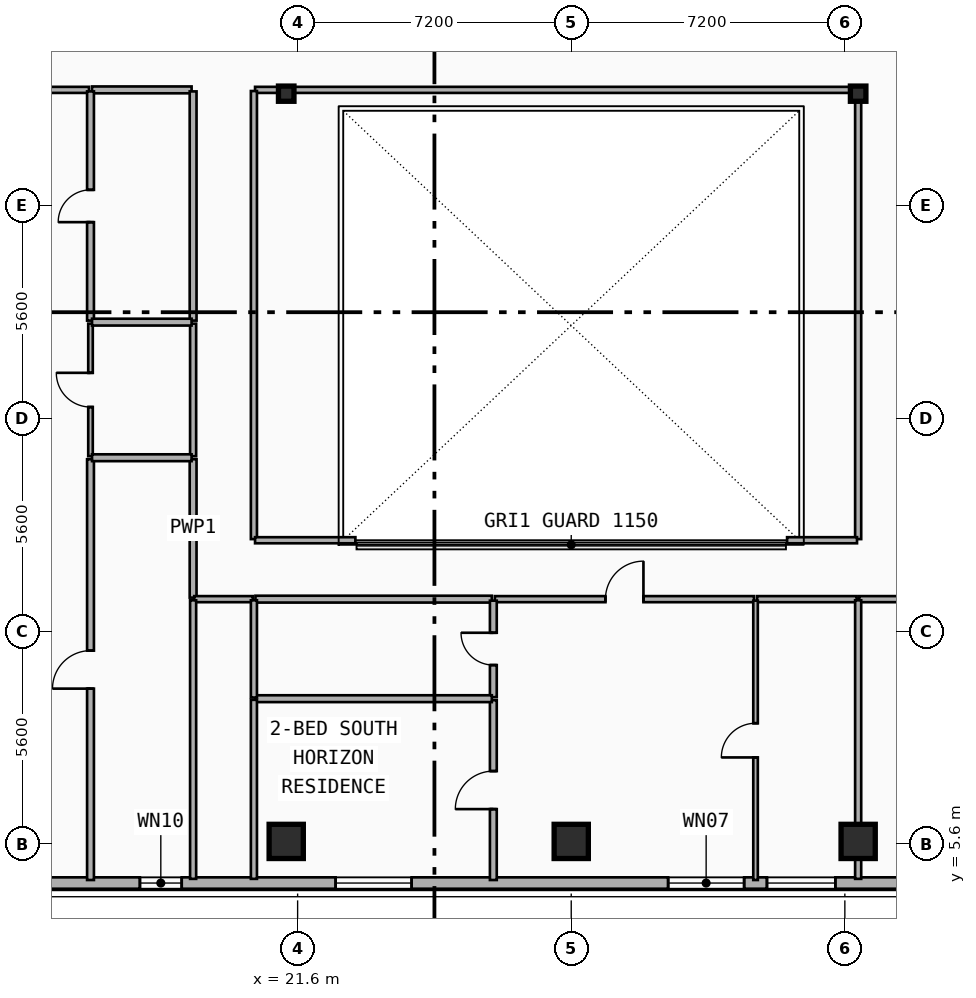
"""IFC4 building model, lengths in metres.
Left out: names, types, materials, properties, quantities, classifications, styles, units other than length and angle.
Written with IfcOpenShell. Run it as: python <this file> out.ifc"""

import sys

from ifc_helpers import new_model, si_unit, direction, frame, frame_2d, origin, origin_2d, place, context, subcontext, project, spatial, rectangle, i_section, extrude, element, fill, save


model = new_model("IFC4")
c1 = context("Model", 3, precision=1e-05, world=origin(), true_north=direction((0.0, 1.0)))
c2 = subcontext(c1, "Body", "Model", "MODEL_VIEW")
j1 = project(units=[si_unit("LENGTHUNIT", "METRE"), si_unit("PLANEANGLEUNIT", "RADIAN")], contexts=[c1])
p1 = place(None, origin())
s1 = spatial("IfcSite", under=j1, at=p1, CompositionType="ELEMENT")
p2 = place(p1, origin())
s2 = spatial("IfcBuilding", under=s1, at=p2, CompositionType="ELEMENT")
p3 = place(p2, frame((0.0, 0.0, 225.6)))
s3 = spatial("IfcBuildingStorey", under=s2, at=p3, CompositionType="ELEMENT", Elevation=225.6)
for number, where, z_axis, x_axis in (
    (1, (21.3, 25.35, 0.0), (0.0, 0.0, 1.0), (1.0, 0.0, 0.0)),
    (2, (36.35, 25.35, 0.0), (0.0, 0.0, 1.0), (1.0, 0.0, 0.0)),
):
    element("IfcColumn", number, at=place(p3, frame(where, z_axis=z_axis, x_axis=x_axis)), inside=s3, PredefinedType="COLUMN", context=c2, shape_type="SweptSolid", body=[
        extrude(i_section(OverallWidth=0.408, OverallDepth=0.4, WebThickness=0.025, FlangeThickness=0.039, FilletRadius=0.015, at=origin_2d()), origin(), (0.0, 0.0, 1.0), 3.6),
    ])
for number, where, z_axis, x_axis in (
    (3, (21.3, 5.784, 0.0), (0.0, -0.09, 0.996), (1.0, 0.0, 0.0)),
    (4, (28.8, 5.784, 0.0), (0.0, -0.09, 0.996), (1.0, 0.0, 0.0)),
    (5, (36.35, 5.784, 0.0), (0.0, -0.09, 0.996), (1.0, 0.0, 0.0)),
):
    element("IfcColumn", number, at=place(p3, frame(where, z_axis=z_axis, x_axis=x_axis)), inside=s3, PredefinedType="COLUMN", context=c2, shape_type="SweptSolid", body=[
        extrude(rectangle(XDim=0.9, YDim=0.9, at=origin_2d()), origin(), (0.0, 0.0, 1.0), 3.615),
    ])
p4 = place(p3, frame((48.0, 4.58, 0.0), z_axis=(0.0, 0.0, 1.0), x_axis=(-1.0, 0.0, 0.0)))
e6 = element("IfcWall", 6, at=p4, inside=s3, PredefinedType="SOLIDWALL", context=c2, shape_type="SweptSolid", body=[
    extrude(rectangle(XDim=38.4, YDim=0.3, at=frame_2d((19.2, 0.0))), origin(), (0.0, 0.0, 1.0), 3.34),
])
p5 = place(p4, frame((33.709, 0.0, 0.34)))
e7 = element("IfcOpeningElement", 7, at=p5, cuts=e6, PredefinedType="OPENING", context=c2, shape_type="SweptSolid", body=[
    extrude(rectangle(XDim=1.4, YDim=1.8, at=frame_2d((0.7, 0.9))), frame((0.0, 0.16, 0.0), z_axis=(0.0, -1.0, 0.0), x_axis=(1.0, 0.0, 0.0)), (0.0, 0.0, 1.0), 0.32),
])
p6 = place(p4, frame((29.45, 0.0, 1.85)))
e8 = element("IfcOpeningElement", 8, at=p6, cuts=e6, PredefinedType="OPENING", context=c2, shape_type="SweptSolid", body=[
    extrude(rectangle(XDim=1.1, YDim=0.9, at=frame_2d((0.55, 0.45))), frame((0.0, 0.16, 0.0), z_axis=(0.0, -1.0, 0.0), x_axis=(1.0, 0.0, 0.0)), (0.0, 0.0, 1.0), 0.32),
])
p7 = place(p4, frame((35.994, 0.0, 0.48)))
e9 = element("IfcOpeningElement", 9, at=p7, cuts=e6, PredefinedType="OPENING", context=c2, shape_type="SweptSolid", body=[
    extrude(rectangle(XDim=1.8, YDim=1.8, at=frame_2d((0.9, 0.9))), frame((0.0, 0.16, 0.0), z_axis=(0.0, -1.0, 0.0), x_axis=(1.0, 0.0, 0.0)), (0.0, 0.0, 1.0), 0.32),
])
p8 = place(p4, frame((14.65, 0.0, 0.65)))
e10 = element("IfcOpeningElement", 10, at=p8, cuts=e6, PredefinedType="OPENING", context=c2, shape_type="SweptSolid", body=[
    extrude(rectangle(XDim=2.0, YDim=2.2, at=frame_2d((1.0, 1.1))), frame((0.0, 0.16, 0.0), z_axis=(0.0, -1.0, 0.0), x_axis=(1.0, 0.0, 0.0)), (0.0, 0.0, 1.0), 0.32),
])
p9 = place(p4, frame((23.4, 0.0, 0.65)))
e11 = element("IfcOpeningElement", 11, at=p9, cuts=e6, PredefinedType="OPENING", context=c2, shape_type="SweptSolid", body=[
    extrude(rectangle(XDim=2.0, YDim=2.2, at=frame_2d((1.0, 1.1))), frame((0.0, 0.16, 0.0), z_axis=(0.0, -1.0, 0.0), x_axis=(1.0, 0.0, 0.0)), (0.0, 0.0, 1.0), 0.32),
])
p10 = place(p4, frame((12.25, 0.0, 0.8)))
e12 = element("IfcOpeningElement", 12, at=p10, cuts=e6, PredefinedType="OPENING", context=c2, shape_type="SweptSolid", body=[
    extrude(rectangle(XDim=1.8, YDim=1.8, at=frame_2d((0.9, 0.9))), frame((0.0, 0.16, 0.0), z_axis=(0.0, -1.0, 0.0), x_axis=(1.0, 0.0, 0.0)), (0.0, 0.0, 1.0), 0.32),
])
p11 = place(p4, frame((3.691, 0.0, 1.22)))
e13 = element("IfcOpeningElement", 13, at=p11, cuts=e6, PredefinedType="OPENING", context=c2, shape_type="SweptSolid", body=[
    extrude(rectangle(XDim=1.2, YDim=1.5, at=frame_2d((0.6, 0.75))), frame((0.0, 0.16, 0.0), z_axis=(0.0, -1.0, 0.0), x_axis=(1.0, 0.0, 0.0)), (0.0, 0.0, 1.0), 0.32),
])
p12 = place(p4, frame((8.25, 0.0, 0.52)))
e14 = element("IfcOpeningElement", 14, at=p12, cuts=e6, PredefinedType="OPENING", context=c2, shape_type="SweptSolid", body=[
    extrude(rectangle(XDim=1.1, YDim=1.05, at=frame_2d((0.55, 0.525))), frame((0.0, 0.16, 0.0), z_axis=(0.0, -1.0, 0.0), x_axis=(1.0, 0.0, 0.0)), (0.0, 0.0, 1.0), 0.32),
])
p13 = place(p4, frame((0.805, 0.0, 0.48)))
e15 = element("IfcOpeningElement", 15, at=p13, cuts=e6, PredefinedType="OPENING", context=c2, shape_type="SweptSolid", body=[
    extrude(rectangle(XDim=1.8, YDim=1.8, at=frame_2d((0.9, 0.9))), frame((0.0, 0.16, 0.0), z_axis=(0.0, -1.0, 0.0), x_axis=(1.0, 0.0, 0.0)), (0.0, 0.0, 1.0), 0.32),
])
p14 = place(p3, frame((12.631, 25.45, 0.0), z_axis=(0.0, 0.0, 1.0), x_axis=(1.0, 0.0, 0.0)))
e16 = element("IfcWall", 16, at=p14, inside=s3, PredefinedType="PARTITIONING", context=c2, shape_type="SweptSolid", body=[
    extrude(rectangle(XDim=3.479, YDim=0.16, at=frame_2d((1.74, 0.0))), origin(), (0.0, 0.0, 1.0), 2.52),
])
p15 = place(p14, frame((1.24, 0.0, 0.0)))
e17 = element("IfcOpeningElement", 17, at=p15, cuts=e16, PredefinedType="OPENING", context=c2, shape_type="SweptSolid", body=[
    extrude(rectangle(XDim=1.0, YDim=2.15, at=frame_2d((0.5, 1.075))), frame((0.0, 0.09, 0.0), z_axis=(0.0, -1.0, 0.0), x_axis=(1.0, 0.0, 0.0)), (0.0, 0.0, 1.0), 0.18),
])
p16 = place(p3, frame((16.19, 25.45, 0.0), z_axis=(0.0, 0.0, 1.0), x_axis=(1.0, 0.0, 0.0)))
e18 = element("IfcWall", 18, at=p16, inside=s3, PredefinedType="PLUMBINGWALL", context=c2, shape_type="SweptSolid", body=[
    extrude(rectangle(XDim=2.62, YDim=0.18, at=frame_2d((1.31, 0.0))), origin(), (0.0, 0.0, 1.0), 3.34),
])
p17 = place(p3, frame((18.85, 12.09, 0.0), z_axis=(0.0, 0.0, 1.0), x_axis=(0.0, 1.0, 0.0)))
e19 = element("IfcWall", 19, at=p17, inside=s3, PredefinedType="PLUMBINGWALL", context=c2, shape_type="SweptSolid", body=[
    extrude(rectangle(XDim=3.641, YDim=0.18, at=frame_2d((1.82, 0.0))), origin(), (0.0, 0.0, 1.0), 2.88),
])
p18 = place(p3, frame((18.85, 15.811, 0.0), z_axis=(0.0, 0.0, 1.0), x_axis=(0.0, 1.0, 0.0)))
e20 = element("IfcWall", 20, at=p18, inside=s3, PredefinedType="PARTITIONING", context=c2, shape_type="SweptSolid", body=[
    extrude(rectangle(XDim=3.488, YDim=0.16, at=frame_2d((1.744, 0.0))), origin(), (0.0, 0.0, 1.0), 2.87),
])
p19 = place(p3, frame((18.85, 19.379, 0.0), z_axis=(0.0, 0.0, 1.0), x_axis=(0.0, 1.0, 0.0)))
e21 = element("IfcWall", 21, at=p19, inside=s3, PredefinedType="PLUMBINGWALL", context=c2, shape_type="SweptSolid", body=[
    extrude(rectangle(XDim=6.031, YDim=0.18, at=frame_2d((3.016, 0.0))), origin(), (0.0, 0.0, 1.0), 2.87),
])
p20 = place(p3, frame((26.79, 12.05, 0.0), z_axis=(0.0, 0.0, 1.0), x_axis=(1.0, 0.0, 0.0)))
e22 = element("IfcWall", 22, at=p20, inside=s3, PredefinedType="PARTITIONING", context=c2, shape_type="SweptSolid", body=[
    extrude(rectangle(XDim=6.82, YDim=0.16, at=frame_2d((3.41, 0.0))), origin(), (0.0, 0.0, 1.0), 2.52),
])
p21 = place(p20, frame((2.91, 0.0, 0.0)))
e23 = element("IfcOpeningElement", 23, at=p21, cuts=e22, PredefinedType="OPENING", context=c2, shape_type="SweptSolid", body=[
    extrude(rectangle(XDim=1.0, YDim=2.15, at=frame_2d((0.5, 1.075))), frame((0.0, 0.09, 0.0), z_axis=(0.0, -1.0, 0.0), x_axis=(1.0, 0.0, 0.0)), (0.0, 0.0, 1.0), 0.18),
])
p22 = place(p3, frame((20.49, 12.05, 0.0), z_axis=(0.0, 0.0, 1.0), x_axis=(1.0, 0.0, 0.0)))
e24 = element("IfcWall", 24, at=p22, inside=s3, PredefinedType="PLUMBINGWALL", context=c2, shape_type="SweptSolid", body=[
    extrude(rectangle(XDim=6.22, YDim=0.18, at=frame_2d((3.11, 0.0))), origin(), (0.0, 0.0, 1.0), 2.52),
])
p23 = place(p3, frame((33.69, 12.05, 0.0), z_axis=(0.0, 0.0, 1.0), x_axis=(1.0, 0.0, 0.0)))
e25 = element("IfcWall", 25, at=p23, inside=s3, PredefinedType="PARTITIONING", context=c2, shape_type="SweptSolid", body=[
    extrude(rectangle(XDim=2.62, YDim=0.16, at=frame_2d((1.31, 0.0))), origin(), (0.0, 0.0, 1.0), 2.52),
])
p24 = place(p3, frame((16.15, 4.66, 0.0), z_axis=(0.0, 0.0, 1.0), x_axis=(0.0, 1.0, 0.0)))
e26 = element("IfcWall", 26, at=p24, inside=s3, PredefinedType="PLUMBINGWALL", context=c2, shape_type="SweptSolid", body=[
    extrude(rectangle(XDim=11.071, YDim=0.18, at=frame_2d((5.536, 0.0))), origin(), (0.0, 0.0, 1.0), 2.87),
])
p25 = place(p24, frame((5.035, 0.0, 0.0)))
e27 = element("IfcOpeningElement", 27, at=p25, cuts=e26, PredefinedType="OPENING", context=c2, shape_type="SweptSolid", body=[
    extrude(rectangle(XDim=1.0, YDim=2.15, at=frame_2d((0.5, 1.075))), frame((0.0, 0.1, 0.0), z_axis=(0.0, -1.0, 0.0), x_axis=(1.0, 0.0, 0.0)), (0.0, 0.0, 1.0), 0.2),
])
p26 = place(p3, frame((16.15, 15.811, 0.0), z_axis=(0.0, 0.0, 1.0), x_axis=(0.0, 1.0, 0.0)))
e28 = element("IfcWall", 28, at=p26, inside=s3, PredefinedType="PARTITIONING", context=c2, shape_type="SweptSolid", body=[
    extrude(rectangle(XDim=3.488, YDim=0.12, at=frame_2d((1.744, 0.0))), origin(), (0.0, 0.0, 1.0), 2.87),
])
p27 = place(p26, frame((1.294, 0.0, 0.0)))
e29 = element("IfcOpeningElement", 29, at=p27, cuts=e28, PredefinedType="OPENING", context=c2, shape_type="SweptSolid", body=[
    extrude(rectangle(XDim=0.9, YDim=2.1, at=frame_2d((0.45, 1.05))), frame((0.0, 0.07, 0.0), z_axis=(0.0, -1.0, 0.0), x_axis=(1.0, 0.0, 0.0)), (0.0, 0.0, 1.0), 0.14),
])
p28 = place(p3, frame((16.15, 19.379, 0.0), z_axis=(0.0, 0.0, 1.0), x_axis=(0.0, 1.0, 0.0)))
e30 = element("IfcWall", 30, at=p28, inside=s3, PredefinedType="PLUMBINGWALL", context=c2, shape_type="SweptSolid", body=[
    extrude(rectangle(XDim=6.031, YDim=0.18, at=frame_2d((3.016, 0.0))), origin(), (0.0, 0.0, 1.0), 2.87),
])
p29 = place(p28, frame((2.591, 0.0, 0.0)))
e31 = element("IfcOpeningElement", 31, at=p29, cuts=e30, PredefinedType="OPENING", context=c2, shape_type="SweptSolid", body=[
    extrude(rectangle(XDim=0.85, YDim=2.1, at=frame_2d((0.425, 1.05))), frame((0.0, 0.1, 0.0), z_axis=(0.0, -1.0, 0.0), x_axis=(1.0, 0.0, 0.0)), (0.0, 0.0, 1.0), 0.2),
])
p30 = place(p3, frame((16.19, 15.771, 0.0), z_axis=(0.0, 0.0, 1.0), x_axis=(1.0, 0.0, 0.0)))
e32 = element("IfcWall", 32, at=p30, inside=s3, PredefinedType="PLUMBINGWALL", context=c2, shape_type="SweptSolid", body=[
    extrude(rectangle(XDim=2.62, YDim=0.18, at=frame_2d((1.31, 0.0))), origin(), (0.0, 0.0, 1.0), 2.87),
])
p31 = place(p3, frame((16.19, 19.339, 0.0), z_axis=(0.0, 0.0, 1.0), x_axis=(1.0, 0.0, 0.0)))
e33 = element("IfcWall", 33, at=p31, inside=s3, PredefinedType="PLUMBINGWALL", context=c2, shape_type="SweptSolid", body=[
    extrude(rectangle(XDim=2.62, YDim=0.18, at=frame_2d((1.31, 0.0))), origin(), (0.0, 0.0, 1.0), 3.34),
])
p32 = place(p3, frame((26.75, 4.66, 0.0), z_axis=(0.0, 0.0, 1.0), x_axis=(0.0, 1.0, 0.0)))
e34 = element("IfcWall", 34, at=p32, inside=s3, PredefinedType="PLUMBINGWALL", context=c2, shape_type="SweptSolid", body=[
    extrude(rectangle(XDim=4.731, YDim=0.18, at=frame_2d((2.366, 0.0))), origin(), (0.0, 0.0, 1.0), 3.0),
])
p33 = place(p32, frame((1.865, 0.0, 0.0)))
e35 = element("IfcOpeningElement", 35, at=p33, cuts=e34, PredefinedType="OPENING", context=c2, shape_type="SweptSolid", body=[
    extrude(rectangle(XDim=1.0, YDim=2.15, at=frame_2d((0.5, 1.075))), frame((0.0, 0.1, 0.0), z_axis=(0.0, -1.0, 0.0), x_axis=(1.0, 0.0, 0.0)), (0.0, 0.0, 1.0), 0.2),
])
p34 = place(p3, frame((26.75, 9.471, 0.0), z_axis=(0.0, 0.0, 1.0), x_axis=(0.0, 1.0, 0.0)))
e36 = element("IfcWall", 36, at=p34, inside=s3, PredefinedType="PLUMBINGWALL", context=c2, shape_type="SweptSolid", body=[
    extrude(rectangle(XDim=2.539, YDim=0.18, at=frame_2d((1.27, 0.0))), origin(), (0.0, 0.0, 1.0), 3.02),
])
p35 = place(p34, frame((0.844, 0.0, 0.0)))
e37 = element("IfcOpeningElement", 37, at=p35, cuts=e36, PredefinedType="OPENING", context=c2, shape_type="SweptSolid", body=[
    extrude(rectangle(XDim=0.85, YDim=2.1, at=frame_2d((0.425, 1.05))), frame((0.0, 0.1, 0.0), z_axis=(0.0, -1.0, 0.0), x_axis=(1.0, 0.0, 0.0)), (0.0, 0.0, 1.0), 0.2),
])
p36 = place(p3, frame((33.65, 4.66, 0.0), z_axis=(0.0, 0.0, 1.0), x_axis=(0.0, 1.0, 0.0)))
e38 = element("IfcWall", 38, at=p36, inside=s3, PredefinedType="PARTITIONING", context=c2, shape_type="SweptSolid", body=[
    extrude(rectangle(XDim=7.35, YDim=0.12, at=frame_2d((3.675, 0.0))), origin(), (0.0, 0.0, 1.0), 3.0),
])
p37 = place(p36, frame((3.225, 0.0, 0.0)))
e39 = element("IfcOpeningElement", 39, at=p37, cuts=e38, PredefinedType="OPENING", context=c2, shape_type="SweptSolid", body=[
    extrude(rectangle(XDim=0.9, YDim=2.1, at=frame_2d((0.45, 1.05))), frame((0.0, 0.07, 0.0), z_axis=(0.0, -1.0, 0.0), x_axis=(1.0, 0.0, 0.0)), (0.0, 0.0, 1.0), 0.14),
])
p38 = place(p3, frame((20.49, 9.431, 0.0), z_axis=(0.0, 0.0, 1.0), x_axis=(1.0, 0.0, 0.0)))
e40 = element("IfcWall", 40, at=p38, inside=s3, PredefinedType="PLUMBINGWALL", context=c2, shape_type="SweptSolid", body=[
    extrude(rectangle(XDim=6.22, YDim=0.18, at=frame_2d((3.11, 0.0))), origin(), (0.0, 0.0, 1.0), 2.52),
])
p39 = place(p3, frame((20.48, 25.45, 0.0), z_axis=(0.0, 0.0, 1.0), x_axis=(1.0, 0.0, 0.0)))
e41 = element("IfcWall", 41, at=p39, inside=s3, PredefinedType="PARTITIONING", context=c2, shape_type="SweptSolid", body=[
    extrude(rectangle(XDim=15.84, YDim=0.16, at=frame_2d((7.92, 0.0))), origin(), (0.0, 0.0, 1.0), 2.52),
])
p40 = place(p3, frame((18.88, 12.05, 0.0), z_axis=(0.0, 0.0, 1.0), x_axis=(1.0, 0.0, 0.0)))
e42 = element("IfcWall", 42, at=p40, inside=s3, PredefinedType="PARTITIONING", context=c2, shape_type="SweptSolid", body=[
    extrude(rectangle(XDim=1.54, YDim=0.16, at=frame_2d((0.77, 0.0))), origin(), (0.0, 0.0, 1.0), 3.34),
])
p41 = place(p3, frame((20.45, 13.63, 0.0), z_axis=(0.0, 0.0, 1.0), x_axis=(0.0, 1.0, 0.0)))
e43 = element("IfcWall", 43, at=p41, inside=s3, PredefinedType="PARTITIONING", context=c2, shape_type="SweptSolid", body=[
    extrude(rectangle(XDim=11.79, YDim=0.16, at=frame_2d((5.895, 0.0))), origin(), (0.0, 0.0, 1.0), 2.87),
])
p42 = place(p3, frame((36.38, 12.05, 0.0), z_axis=(0.0, 0.0, 1.0), x_axis=(1.0, 0.0, 0.0)))
e44 = element("IfcWall", 44, at=p42, inside=s3, PredefinedType="PARTITIONING", context=c2, shape_type="SweptSolid", body=[
    extrude(rectangle(XDim=1.94, YDim=0.16, at=frame_2d((0.97, 0.0))), origin(), (0.0, 0.0, 1.0), 2.52),
])
p43 = place(p3, frame((36.35, 13.63, 0.0), z_axis=(0.0, 0.0, 1.0), x_axis=(0.0, 1.0, 0.0)))
e45 = element("IfcWall", 45, at=p43, inside=s3, PredefinedType="PARTITIONING", context=c2, shape_type="SweptSolid", body=[
    extrude(rectangle(XDim=11.79, YDim=0.16, at=frame_2d((5.895, 0.0))), origin(), (0.0, 0.0, 1.0), 2.52),
])
p44 = place(p3, frame((20.48, 13.6, 0.0), z_axis=(0.0, 0.0, 1.0), x_axis=(1.0, 0.0, 0.0)))
e46 = element("IfcWall", 46, at=p44, inside=s3, PredefinedType="PARTITIONING", context=c2, shape_type="SweptSolid", body=[
    extrude(rectangle(XDim=2.64, YDim=0.16, at=frame_2d((1.32, 0.0))), origin(), (0.0, 0.0, 1.0), 2.52),
])
p45 = place(p3, frame((34.48, 13.6, 0.0), z_axis=(0.0, 0.0, 1.0), x_axis=(1.0, 0.0, 0.0)))
e47 = element("IfcWall", 47, at=p45, inside=s3, PredefinedType="PARTITIONING", context=c2, shape_type="SweptSolid", body=[
    extrude(rectangle(XDim=1.84, YDim=0.16, at=frame_2d((0.92, 0.0))), origin(), (0.0, 0.0, 1.0), 2.52),
])
p46 = place(p3, frame((18.85, 4.69, 0.0), z_axis=(0.0, 0.0, 1.0), x_axis=(0.0, 1.0, 0.0)))
e48 = element("IfcWall", 48, at=p46, inside=s3, PredefinedType="PARTITIONING", context=c2, shape_type="SweptSolid", body=[
    extrude(rectangle(XDim=7.33, YDim=0.16, at=frame_2d((3.665, 0.0))), origin(), (0.0, 0.0, 1.0), 2.87),
])
p47 = place(p3, frame((20.45, 4.69, 0.0), z_axis=(0.0, 0.0, 1.0), x_axis=(0.0, 1.0, 0.0)))
e49 = element("IfcWall", 49, at=p47, inside=s3, PredefinedType="PARTITIONING", context=c2, shape_type="SweptSolid", body=[
    extrude(rectangle(XDim=4.711, YDim=0.16, at=frame_2d((2.355, 0.0))), origin(), (0.0, 0.0, 1.0), 2.87),
])
p48 = place(p3, frame((20.45, 9.461, 0.0), z_axis=(0.0, 0.0, 1.0), x_axis=(0.0, 1.0, 0.0)))
e50 = element("IfcWall", 50, at=p48, inside=s3, PredefinedType="PARTITIONING", context=c2, shape_type="SweptSolid", body=[
    extrude(rectangle(XDim=2.559, YDim=0.16, at=frame_2d((1.28, 0.0))), origin(), (0.0, 0.0, 1.0), 2.87),
])
p49 = place(p3, frame((36.35, 4.69, 0.0), z_axis=(0.0, 0.0, 1.0), x_axis=(0.0, 1.0, 0.0)))
e51 = element("IfcWall", 51, at=p49, inside=s3, PredefinedType="PARTITIONING", context=c2, shape_type="SweptSolid", body=[
    extrude(rectangle(XDim=7.33, YDim=0.16, at=frame_2d((3.665, 0.0))), origin(), (0.0, 0.0, 1.0), 2.52),
])
p50 = place(p6, origin())
e52 = element("IfcWindow", 52, at=p50, inside=s3, PartitioningType="SINGLE_PANEL", PredefinedType="WINDOW", context=c2, shape_type="SweptSolid", body=[
    extrude(rectangle(XDim=1.1, YDim=0.9, at=frame_2d((0.55, 0.45))), frame((0.0, 0.03, 0.0), z_axis=(0.0, -1.0, 0.0), x_axis=(1.0, 0.0, 0.0)), (0.0, 0.0, 1.0), 0.06),
])
fill(e8, e52)
p51 = place(p8, origin())
e53 = element("IfcWindow", 53, at=p51, inside=s3, PartitioningType="SINGLE_PANEL", PredefinedType="WINDOW", context=c2, shape_type="SweptSolid", body=[
    extrude(rectangle(XDim=2.0, YDim=2.2, at=frame_2d((1.0, 1.1))), frame((0.0, 0.03, 0.0), z_axis=(0.0, -1.0, 0.0), x_axis=(1.0, 0.0, 0.0)), (0.0, 0.0, 1.0), 0.06),
])
fill(e10, e53)
p52 = place(p9, origin())
e54 = element("IfcWindow", 54, at=p52, inside=s3, PartitioningType="SINGLE_PANEL", PredefinedType="WINDOW", context=c2, shape_type="SweptSolid", body=[
    extrude(rectangle(XDim=2.0, YDim=2.2, at=frame_2d((1.0, 1.1))), frame((0.0, 0.03, 0.0), z_axis=(0.0, -1.0, 0.0), x_axis=(1.0, 0.0, 0.0)), (0.0, 0.0, 1.0), 0.06),
])
fill(e11, e54)
p53 = place(p10, origin())
e55 = element("IfcWindow", 55, at=p53, inside=s3, PartitioningType="SINGLE_PANEL", PredefinedType="WINDOW", context=c2, shape_type="SweptSolid", body=[
    extrude(rectangle(XDim=1.8, YDim=1.8, at=frame_2d((0.9, 0.9))), frame((0.0, 0.03, 0.0), z_axis=(0.0, -1.0, 0.0), x_axis=(1.0, 0.0, 0.0)), (0.0, 0.0, 1.0), 0.06),
])
fill(e12, e55)
p54 = place(p21, origin())
e56 = element("IfcDoor", 56, at=p54, inside=s3, OperationType="SINGLE_SWING_RIGHT", PredefinedType="DOOR", context=c2, shape_type="SweptSolid", body=[
    extrude(rectangle(XDim=1.0, YDim=2.15, at=frame_2d((0.5, 1.075))), frame((0.0, 0.025, 0.0), z_axis=(0.0, -1.0, 0.0), x_axis=(1.0, 0.0, 0.0)), (0.0, 0.0, 1.0), 0.05),
])
fill(e23, e56)
p55 = place(p25, origin())
e57 = element("IfcDoor", 57, at=p55, inside=s3, OperationType="SINGLE_SWING_LEFT", PredefinedType="DOOR", context=c2, shape_type="SweptSolid", body=[
    extrude(rectangle(XDim=1.0, YDim=2.15, at=frame_2d((0.5, 1.075))), frame((0.0, 0.025, 0.0), z_axis=(0.0, -1.0, 0.0), x_axis=(1.0, 0.0, 0.0)), (0.0, 0.0, 1.0), 0.05),
])
fill(e27, e57)
p56 = place(p27, origin())
e58 = element("IfcDoor", 58, at=p56, inside=s3, OperationType="SINGLE_SWING_RIGHT", PredefinedType="DOOR", context=c2, shape_type="SweptSolid", body=[
    extrude(rectangle(XDim=0.9, YDim=2.1, at=frame_2d((0.45, 1.05))), frame((0.0, 0.025, 0.0), z_axis=(0.0, -1.0, 0.0), x_axis=(1.0, 0.0, 0.0)), (0.0, 0.0, 1.0), 0.05),
])
fill(e29, e58)
p57 = place(p29, origin())
e59 = element("IfcDoor", 59, at=p57, inside=s3, OperationType="SINGLE_SWING_LEFT", PredefinedType="DOOR", context=c2, shape_type="SweptSolid", body=[
    extrude(rectangle(XDim=0.85, YDim=2.1, at=frame_2d((0.425, 1.05))), frame((0.0, 0.025, 0.0), z_axis=(0.0, -1.0, 0.0), x_axis=(1.0, 0.0, 0.0)), (0.0, 0.0, 1.0), 0.05),
])
fill(e31, e59)
p58 = place(p33, origin())
e60 = element("IfcDoor", 60, at=p58, inside=s3, OperationType="SINGLE_SWING_LEFT", PredefinedType="DOOR", context=c2, shape_type="SweptSolid", body=[
    extrude(rectangle(XDim=1.0, YDim=2.15, at=frame_2d((0.5, 1.075))), frame((0.0, 0.025, 0.0), z_axis=(0.0, -1.0, 0.0), x_axis=(1.0, 0.0, 0.0)), (0.0, 0.0, 1.0), 0.05),
])
fill(e35, e60)
p59 = place(p35, origin())
e61 = element("IfcDoor", 61, at=p59, inside=s3, OperationType="SINGLE_SWING_RIGHT", PredefinedType="DOOR", context=c2, shape_type="SweptSolid", body=[
    extrude(rectangle(XDim=0.85, YDim=2.1, at=frame_2d((0.425, 1.05))), frame((0.0, 0.025, 0.0), z_axis=(0.0, -1.0, 0.0), x_axis=(1.0, 0.0, 0.0)), (0.0, 0.0, 1.0), 0.05),
])
fill(e37, e61)
p60 = place(p37, origin())
e62 = element("IfcDoor", 62, at=p60, inside=s3, OperationType="SINGLE_SWING_LEFT", PredefinedType="DOOR", context=c2, shape_type="SweptSolid", body=[
    extrude(rectangle(XDim=0.9, YDim=2.1, at=frame_2d((0.45, 1.05))), frame((0.0, 0.025, 0.0), z_axis=(0.0, -1.0, 0.0), x_axis=(1.0, 0.0, 0.0)), (0.0, 0.0, 1.0), 0.05),
])
fill(e39, e62)
save(model, sys.argv[1])
